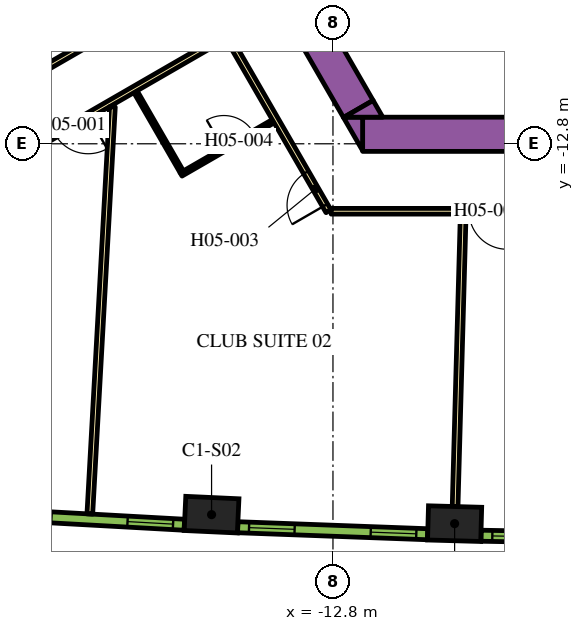
"""IFC4 building model, lengths in metres.
Left out: names, types, materials, properties, quantities, classifications, styles, units other than length and angle.
Written with IfcOpenShell. Run it as: python <this file> out.ifc"""

import sys

from ifc_helpers import new_model, si_unit, direction, frame, frame_2d, origin, origin_2d, place, context, subcontext, project, spatial, polyline, rectangle, outline, extrude, element, fill, save


model = new_model("IFC4")
c1 = context("Model", 3, precision=1e-05, world=origin(), true_north=direction((0.0, 1.0)))
c2 = subcontext(c1, "Body", "Model", "MODEL_VIEW")
j1 = project(units=[si_unit("LENGTHUNIT", "METRE"), si_unit("PLANEANGLEUNIT", "RADIAN")], contexts=[c1])
p1 = place(None, origin())
s1 = spatial("IfcSite", under=j1, at=p1, CompositionType="ELEMENT")
p2 = place(p1, origin())
s2 = spatial("IfcBuilding", under=s1, at=p2, CompositionType="ELEMENT")
p3 = place(p2, frame((0.0, 0.0, 74.4)))
s3 = spatial("IfcBuildingStorey", under=s2, at=p3, CompositionType="ELEMENT", Elevation=74.4)
for number, where, z_axis, x_axis in (
    (1, (-15.994, -22.558, 0.0), (0.0, 0.0, 1.0), (0.999, -0.046, 0.0)),
    (2, (-9.599, -22.795, 0.0), (0.0, 0.0, 1.0), (1.0, -0.028, 0.0)),
):
    element("IfcColumn", number, at=place(p3, frame(where, z_axis=z_axis, x_axis=x_axis)), inside=s3, PredefinedType="COLUMN", context=c2, shape_type="SweptSolid", body=[
        extrude(rectangle(XDim=1.4, YDim=0.9, at=origin_2d()), origin(), (0.0, 0.0, 1.0), 3.9),
    ])
p4 = place(p3, frame((-12.019, -12.55, 0.0), z_axis=(0.0, 0.0, 1.0), x_axis=(1.0, 0.0, 0.0)))
e3 = element("IfcWall", 3, at=p4, inside=s3, PredefinedType="SOLIDWALL", context=c2, shape_type="SweptSolid", body=[
    extrude(rectangle(XDim=21.63, YDim=0.9, at=frame_2d((10.815, 0.0))), origin(), (0.0, 0.0, 1.0), 3.9),
])
p5 = place(p3, origin())
e4 = element("IfcWall", 4, at=p5, inside=s3, PredefinedType="SOLIDWALL", context=c2, shape_type="SweptSolid", body=[
    extrude(outline(polyline([(-12.529, -12.1), (-12.021, -12.1), (-12.021, -12.98), (-12.529, -12.1)])), origin(), (0.0, 0.0, 1.0), 3.9),
])
p6 = place(p3, frame((-12.134, -11.883, 0.0), z_axis=(0.0, 0.0, 1.0), x_axis=(-0.500005339912, 0.866022320763, 0.0)))
e5 = element("IfcWall", 5, at=p6, inside=s3, PredefinedType="SOLIDWALL", context=c2, shape_type="SweptSolid", body=[
    extrude(rectangle(XDim=9.488, YDim=0.9, at=frame_2d((4.744, 0.0))), origin(), (0.0, 0.0, 1.0), 3.9),
])
e6 = element("IfcWall", 6, at=p5, inside=s3, PredefinedType="SOLIDWALL", context=c2, shape_type="SweptSolid", body=[
    extrude(outline(polyline([(-11.489, -12.1), (-12.505, -12.1), (-11.743, -11.66), (-11.489, -12.1)])), origin(), (0.0, 0.0, 1.0), 3.9),
])
p7 = place(p3, frame((-30.463, -16.635, 0.0), z_axis=(0.0, 0.0, 1.0), x_axis=(0.866022394896, 0.500005211512, 0.0)))
e7 = element("IfcWall", 7, at=p7, inside=s3, PredefinedType="PARTITIONING", context=c2, shape_type="SweptSolid", body=[
    extrude(rectangle(XDim=16.144, YDim=0.15, at=frame_2d((8.072, 0.0))), origin(), (0.0, 0.0, 1.0), 2.7),
])
p8 = place(p7, frame((13.948, 0.0, 0.0)))
e8 = element("IfcOpeningElement", 8, at=p8, cuts=e7, PredefinedType="OPENING", context=c2, shape_type="SweptSolid", body=[
    extrude(rectangle(XDim=0.9, YDim=2.1, at=frame_2d((0.45, 1.05))), frame((0.0, 0.085, 0.0), z_axis=(0.0, -1.0, 0.0), x_axis=(1.0, 0.0, 0.0)), (0.0, 0.0, 1.0), 0.17),
])
p9 = place(p7, frame((10.329, 0.0, 0.0)))
e9 = element("IfcOpeningElement", 9, at=p9, cuts=e7, PredefinedType="OPENING", context=c2, shape_type="SweptSolid", body=[
    extrude(rectangle(XDim=0.9, YDim=2.1, at=frame_2d((0.45, 1.05))), frame((0.0, 0.085, 0.0), z_axis=(0.0, -1.0, 0.0), x_axis=(1.0, 0.0, 0.0)), (0.0, 0.0, 1.0), 0.17),
])
p10 = place(p7, frame((7.275, 0.0, 0.0)))
e10 = element("IfcOpeningElement", 10, at=p10, cuts=e7, PredefinedType="OPENING", context=c2, shape_type="SweptSolid", body=[
    extrude(rectangle(XDim=1.0, YDim=2.1, at=frame_2d((0.5, 1.05))), frame((0.0, 0.085, 0.0), z_axis=(0.0, -1.0, 0.0), x_axis=(1.0, 0.0, 0.0)), (0.0, 0.0, 1.0), 0.17),
])
p11 = place(p3, frame((-15.587, -9.952, 0.0), z_axis=(0.0, 0.0, 1.0), x_axis=(-0.866022197818, -0.500005552856, 0.0)))
e11 = element("IfcWall", 11, at=p11, inside=s3, PredefinedType="PARTITIONING", context=c2, shape_type="SweptSolid", body=[
    extrude(rectangle(XDim=16.224, YDim=0.15, at=frame_2d((8.112, 0.0))), origin(), (0.0, 0.0, 1.0), 2.7),
])
p12 = place(p11, frame((4.22, 0.0, 0.0)))
e12 = element("IfcOpeningElement", 12, at=p12, cuts=e11, PredefinedType="OPENING", context=c2, shape_type="SweptSolid", body=[
    extrude(rectangle(XDim=1.0, YDim=2.1, at=frame_2d((0.5, 1.05))), frame((0.0, 0.085, 0.0), z_axis=(0.0, -1.0, 0.0), x_axis=(1.0, 0.0, 0.0)), (0.0, 0.0, 1.0), 0.17),
])
p13 = place(p3, frame((-12.918, -14.575, 0.0), z_axis=(0.0, 0.0, 1.0), x_axis=(-0.500009150678, 0.866020120573, 0.0)))
e13 = element("IfcWall", 13, at=p13, inside=s3, PredefinedType="PARTITIONING", context=c2, shape_type="SweptSolid", body=[
    extrude(rectangle(XDim=5.258, YDim=0.15, at=frame_2d((2.629, 0.0))), origin(), (0.0, 0.0, 1.0), 2.7),
])
p14 = place(p13, frame((0.18, 0.0, 0.0)))
e14 = element("IfcOpeningElement", 14, at=p14, cuts=e13, PredefinedType="OPENING", context=c2, shape_type="SweptSolid", body=[
    extrude(rectangle(XDim=1.0, YDim=2.1, at=frame_2d((0.5, 1.05))), frame((0.0, 0.085, 0.0), z_axis=(0.0, -1.0, 0.0), x_axis=(1.0, 0.0, 0.0)), (0.0, 0.0, 1.0), 0.17),
])
p15 = place(p3, frame((12.918, -14.575, 0.0), z_axis=(0.0, 0.0, 1.0), x_axis=(-1.0, 0.0, 0.0)))
e15 = element("IfcWall", 15, at=p15, inside=s3, PredefinedType="PARTITIONING", context=c2, shape_type="SweptSolid", body=[
    extrude(rectangle(XDim=25.766, YDim=0.15, at=frame_2d((12.883, 0.0))), origin(), (0.0, 0.0, 1.0), 2.7),
])
p16 = place(p15, frame((21.137, 0.0, 0.0)))
e16 = element("IfcOpeningElement", 16, at=p16, cuts=e15, PredefinedType="OPENING", context=c2, shape_type="SweptSolid", body=[
    extrude(rectangle(XDim=1.0, YDim=2.1, at=frame_2d((0.5, 1.05))), frame((0.0, 0.085, 0.0), z_axis=(0.0, -1.0, 0.0), x_axis=(1.0, 0.0, 0.0)), (0.0, 0.0, 1.0), 0.17),
])
p17 = place(p15, frame((3.699, 0.0, 0.0)))
e17 = element("IfcOpeningElement", 17, at=p17, cuts=e15, PredefinedType="OPENING", context=c2, shape_type="SweptSolid", body=[
    extrude(rectangle(XDim=1.0, YDim=2.1, at=frame_2d((0.5, 1.05))), frame((0.0, 0.085, 0.0), z_axis=(0.0, -1.0, 0.0), x_axis=(1.0, 0.0, 0.0)), (0.0, 0.0, 1.0), 0.17),
])
p18 = place(p15, frame((2.392, 0.0, 0.0)))
e18 = element("IfcOpeningElement", 18, at=p18, cuts=e15, PredefinedType="OPENING", context=c2, shape_type="SweptSolid", body=[
    extrude(rectangle(XDim=1.0, YDim=2.1, at=frame_2d((0.5, 1.05))), frame((0.0, 0.085, 0.0), z_axis=(0.0, -1.0, 0.0), x_axis=(1.0, 0.0, 0.0)), (0.0, 0.0, 1.0), 0.17),
])
p19 = place(p3, frame((-19.198, -22.541, 0.0), z_axis=(0.0, 0.0, 1.0), x_axis=(0.055432210572, 0.99846245299, 0.0)))
e19 = element("IfcWall", 19, at=p19, inside=s3, PredefinedType="PARTITIONING", context=c2, shape_type="SweptSolid", body=[
    extrude(rectangle(XDim=10.729, YDim=0.15, at=frame_2d((5.365, 0.0))), origin(), (0.0, 0.0, 1.0), 2.7),
])
p20 = place(p3, frame((-9.586, -22.345, 0.0), z_axis=(0.0, 0.0, 1.0), x_axis=(0.027722115646, 0.999615668297, 0.0)))
e20 = element("IfcWall", 20, at=p20, inside=s3, PredefinedType="PARTITIONING", context=c2, shape_type="SweptSolid", body=[
    extrude(rectangle(XDim=7.688, YDim=0.15, at=frame_2d((3.844, 0.0))), origin(), (0.0, 0.0, 1.0), 2.7),
])
p21 = place(p3, frame((-16.797, -13.606, 0.0), z_axis=(0.0, 0.0, 1.0), x_axis=(0.866034573852, 0.49998411664, 0.0)))
e21 = element("IfcWall", 21, at=p21, inside=s3, PredefinedType="PARTITIONING", context=c2, shape_type="SweptSolid", body=[
    extrude(rectangle(XDim=2.8, YDim=0.1, at=frame_2d((1.4, 0.0))), origin(), (0.0, 0.0, 1.0), 2.7),
])
p22 = place(p21, frame((1.3, 0.0, 0.0)))
e22 = element("IfcOpeningElement", 22, at=p22, cuts=e21, PredefinedType="OPENING", context=c2, shape_type="SweptSolid", body=[
    extrude(rectangle(XDim=0.9, YDim=2.1, at=frame_2d((0.45, 1.05))), frame((0.0, 0.06, 0.0), z_axis=(0.0, -1.0, 0.0), x_axis=(1.0, 0.0, 0.0)), (0.0, 0.0, 1.0), 0.12),
])
p23 = place(p3, frame((-16.779, -13.538, 0.0), z_axis=(0.0, 0.0, 1.0), x_axis=(-0.500061642096, 0.865989811779, 0.0)))
e23 = element("IfcWall", 23, at=p23, inside=s3, PredefinedType="PARTITIONING", context=c2, shape_type="SweptSolid", body=[
    extrude(rectangle(XDim=2.43, YDim=0.1, at=frame_2d((1.215, 0.0))), origin(), (0.0, 0.0, 1.0), 2.7),
])
p24 = place(p3, frame((-21.701, -22.547, 0.0), z_axis=(0.0, 0.0, 1.0), x_axis=(0.998464708705, -0.055391564976, 0.0)))
e24 = element("IfcWall", 24, at=p24, inside=s3, PredefinedType="SOLIDWALL", context=c2, shape_type="SweptSolid", body=[
    extrude(rectangle(XDim=4.998, YDim=0.29, at=frame_2d((2.499, 0.0))), origin(), (0.0, 0.0, 1.0), 3.6),
])
p25 = place(p24, frame((0.297, 0.0, 0.9)))
e25 = element("IfcOpeningElement", 25, at=p25, cuts=e24, PredefinedType="OPENING", context=c2, shape_type="SweptSolid", body=[
    extrude(rectangle(XDim=1.2, YDim=2.15, at=frame_2d((0.6, 1.075))), frame((0.0, 0.155, 0.0), z_axis=(0.0, -1.0, 0.0), x_axis=(1.0, 0.0, 0.0)), (0.0, 0.0, 1.0), 0.31),
])
p26 = place(p24, frame((3.501, 0.0, 0.9)))
e26 = element("IfcOpeningElement", 26, at=p26, cuts=e24, PredefinedType="OPENING", context=c2, shape_type="SweptSolid", body=[
    extrude(rectangle(XDim=1.2, YDim=2.15, at=frame_2d((0.6, 1.075))), frame((0.0, 0.155, 0.0), z_axis=(0.0, -1.0, 0.0), x_axis=(1.0, 0.0, 0.0)), (0.0, 0.0, 1.0), 0.31),
])
p27 = place(p3, frame((-15.305, -22.889, 0.0), z_axis=(0.0, 0.0, 1.0), x_axis=(0.999317974969, -0.036926750529, 0.0)))
e27 = element("IfcWall", 27, at=p27, inside=s3, PredefinedType="SOLIDWALL", context=c2, shape_type="SweptSolid", body=[
    extrude(rectangle(XDim=4.998, YDim=0.29, at=frame_2d((2.499, 0.0))), origin(), (0.0, 0.0, 1.0), 3.6),
])
p28 = place(p27, frame((0.297, 0.0, 0.9)))
e28 = element("IfcOpeningElement", 28, at=p28, cuts=e27, PredefinedType="OPENING", context=c2, shape_type="SweptSolid", body=[
    extrude(rectangle(XDim=1.2, YDim=2.15, at=frame_2d((0.6, 1.075))), frame((0.0, 0.155, 0.0), z_axis=(0.0, -1.0, 0.0), x_axis=(1.0, 0.0, 0.0)), (0.0, 0.0, 1.0), 0.31),
])
p29 = place(p27, frame((3.501, 0.0, 0.9)))
e29 = element("IfcOpeningElement", 29, at=p29, cuts=e27, PredefinedType="OPENING", context=c2, shape_type="SweptSolid", body=[
    extrude(rectangle(XDim=1.2, YDim=2.15, at=frame_2d((0.6, 1.075))), frame((0.0, 0.155, 0.0), z_axis=(0.0, -1.0, 0.0), x_axis=(1.0, 0.0, 0.0)), (0.0, 0.0, 1.0), 0.31),
])
p30 = place(p3, frame((-8.904, -23.113, 0.0), z_axis=(0.0, 0.0, 1.0), x_axis=(0.999829529479, -0.018463801951, 0.0)))
e30 = element("IfcWall", 30, at=p30, inside=s3, PredefinedType="SOLIDWALL", context=c2, shape_type="SweptSolid", body=[
    extrude(rectangle(XDim=4.998, YDim=0.29, at=frame_2d((2.499, 0.0))), origin(), (0.0, 0.0, 1.0), 3.6),
])
p31 = place(p30, frame((0.297, 0.0, 0.9)))
e31 = element("IfcOpeningElement", 31, at=p31, cuts=e30, PredefinedType="OPENING", context=c2, shape_type="SweptSolid", body=[
    extrude(rectangle(XDim=1.2, YDim=2.15, at=frame_2d((0.6, 1.075))), frame((0.0, 0.155, 0.0), z_axis=(0.0, -1.0, 0.0), x_axis=(1.0, 0.0, 0.0)), (0.0, 0.0, 1.0), 0.31),
])
p32 = place(p30, frame((3.501, 0.0, 0.9)))
e32 = element("IfcOpeningElement", 32, at=p32, cuts=e30, PredefinedType="OPENING", context=c2, shape_type="SweptSolid", body=[
    extrude(rectangle(XDim=1.2, YDim=2.15, at=frame_2d((0.6, 1.075))), frame((0.0, 0.155, 0.0), z_axis=(0.0, -1.0, 0.0), x_axis=(1.0, 0.0, 0.0)), (0.0, 0.0, 1.0), 0.31),
])
p33 = place(p12, origin())
e33 = element("IfcDoor", 33, at=p33, inside=s3, OperationType="SINGLE_SWING_LEFT", PredefinedType="DOOR", context=c2, shape_type="SweptSolid", body=[
    extrude(rectangle(XDim=1.0, YDim=2.1, at=frame_2d((0.5, 1.05))), frame((0.0, 0.025, 0.0), z_axis=(0.0, -1.0, 0.0), x_axis=(1.0, 0.0, 0.0)), (0.0, 0.0, 1.0), 0.05),
])
fill(e12, e33)
p34 = place(p14, origin())
e34 = element("IfcDoor", 34, at=p34, inside=s3, OperationType="SINGLE_SWING_LEFT", PredefinedType="DOOR", context=c2, shape_type="SweptSolid", body=[
    extrude(rectangle(XDim=1.0, YDim=2.1, at=frame_2d((0.5, 1.05))), frame((0.0, 0.025, 0.0), z_axis=(0.0, -1.0, 0.0), x_axis=(1.0, 0.0, 0.0)), (0.0, 0.0, 1.0), 0.05),
])
fill(e14, e34)
p35 = place(p22, origin())
e35 = element("IfcDoor", 35, at=p35, inside=s3, OperationType="SINGLE_SWING_LEFT", PredefinedType="DOOR", context=c2, shape_type="SweptSolid", body=[
    extrude(rectangle(XDim=0.9, YDim=2.1, at=frame_2d((0.45, 1.05))), frame((0.0, 0.025, 0.0), z_axis=(0.0, -1.0, 0.0), x_axis=(1.0, 0.0, 0.0)), (0.0, 0.0, 1.0), 0.05),
])
fill(e22, e35)
p36 = place(p16, origin())
e36 = element("IfcDoor", 36, at=p36, inside=s3, OperationType="SINGLE_SWING_RIGHT", PredefinedType="DOOR", context=c2, shape_type="SweptSolid", body=[
    extrude(rectangle(XDim=1.0, YDim=2.1, at=frame_2d((0.5, 1.05))), frame((0.0, 0.025, 0.0), z_axis=(0.0, -1.0, 0.0), x_axis=(1.0, 0.0, 0.0)), (0.0, 0.0, 1.0), 0.05),
])
fill(e16, e36)
p37 = place(p26, origin())
e37 = element("IfcWindow", 37, at=p37, inside=s3, PartitioningType="DOUBLE_PANEL_VERTICAL", PredefinedType="WINDOW", context=c2, shape_type="SweptSolid", body=[
    extrude(rectangle(XDim=1.2, YDim=2.15, at=frame_2d((0.6, 1.075))), frame((0.0, 0.015, 0.0), z_axis=(0.0, -1.0, 0.0), x_axis=(1.0, 0.0, 0.0)), (0.0, 0.0, 1.0), 0.06),
])
fill(e26, e37)
p38 = place(p28, origin())
e38 = element("IfcWindow", 38, at=p38, inside=s3, PartitioningType="DOUBLE_PANEL_VERTICAL", PredefinedType="WINDOW", context=c2, shape_type="SweptSolid", body=[
    extrude(rectangle(XDim=1.2, YDim=2.15, at=frame_2d((0.6, 1.075))), frame((0.0, 0.015, 0.0), z_axis=(0.0, -1.0, 0.0), x_axis=(1.0, 0.0, 0.0)), (0.0, 0.0, 1.0), 0.06),
])
fill(e28, e38)
p39 = place(p29, origin())
e39 = element("IfcWindow", 39, at=p39, inside=s3, PartitioningType="DOUBLE_PANEL_VERTICAL", PredefinedType="WINDOW", context=c2, shape_type="SweptSolid", body=[
    extrude(rectangle(XDim=1.2, YDim=2.15, at=frame_2d((0.6, 1.075))), frame((0.0, 0.015, 0.0), z_axis=(0.0, -1.0, 0.0), x_axis=(1.0, 0.0, 0.0)), (0.0, 0.0, 1.0), 0.06),
])
fill(e29, e39)
p40 = place(p31, origin())
e40 = element("IfcWindow", 40, at=p40, inside=s3, PartitioningType="DOUBLE_PANEL_VERTICAL", PredefinedType="WINDOW", context=c2, shape_type="SweptSolid", body=[
    extrude(rectangle(XDim=1.2, YDim=2.15, at=frame_2d((0.6, 1.075))), frame((0.0, 0.015, 0.0), z_axis=(0.0, -1.0, 0.0), x_axis=(1.0, 0.0, 0.0)), (0.0, 0.0, 1.0), 0.06),
])
fill(e31, e40)
save(model, sys.argv[1])
